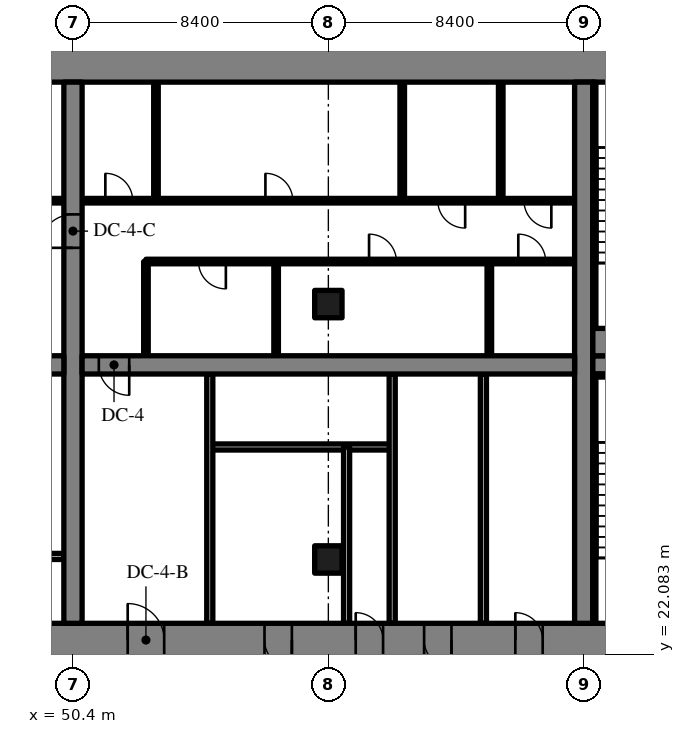
"""IFC4 building model, lengths in metres.
Left out: names, types, materials, properties, quantities, classifications, styles, units other than length and angle.
Written with IfcOpenShell. Run it as: python <this file> out.ifc"""

import sys

from ifc_helpers import new_model, si_unit, direction, frame, frame_2d, origin, origin_2d, place, context, subcontext, project, spatial, rectangle, extrude, source, transform, mapped, element, fill, save


model = new_model("IFC4")
c1 = context("Model", 3, precision=1e-05, world=origin(), true_north=direction((0.0, 1.0)))
c2 = subcontext(c1, "Body", "Model", "MODEL_VIEW")
j1 = project(units=[si_unit("LENGTHUNIT", "METRE"), si_unit("PLANEANGLEUNIT", "RADIAN")], contexts=[c1])
p1 = place(None, origin())
s1 = spatial("IfcSite", under=j1, at=p1, CompositionType="ELEMENT")
p2 = place(p1, origin())
s2 = spatial("IfcBuilding", under=s1, at=p2, CompositionType="ELEMENT")
p3 = place(p2, frame((0.0, 0.0, -4.5)))
s3 = spatial("IfcBuildingStorey", under=s2, at=p3, CompositionType="ELEMENT", Elevation=-4.5)
m1 = source(origin(), c2, "Body", "SweptSolid", [
    extrude(rectangle(XDim=50.4, YDim=1.1, at=frame_2d((25.2, 0.0))), origin(), (0.0, 0.0, 1.0), 4.22),
])
p4 = place(p3, frame((25.2, 22.55, 0.0), z_axis=(0.0, 0.0, 1.0), x_axis=(1.0, 0.0, 0.0)))
e1 = element("IfcWall", 1, at=p4, inside=s3, PredefinedType="SHEAR", context=c2, shape_type="MappedRepresentation", body=[
    mapped(m1, transform((0.0, 0.0, 0.0), scale=1.0)),
])
m2 = source(origin(), c2, "Body", "SweptSolid", [
    extrude(rectangle(XDim=1.8, YDim=2.1, at=frame_2d((0.9, 1.05))), frame((0.0, 0.56, 0.0), z_axis=(0.0, -1.0, 0.0), x_axis=(1.0, 0.0, 0.0)), (0.0, 0.0, 1.0), 1.12),
])
p5 = place(p4, frame((15.9, 0.0, 0.0)))
e2 = element("IfcOpeningElement", 2, at=p5, cuts=e1, PredefinedType="OPENING", context=c2, shape_type="MappedRepresentation", body=[
    mapped(m2, transform((0.0, 0.0, 0.0), scale=1.0)),
])
m3 = source(origin(), c2, "Body", "SweptSolid", [
    extrude(rectangle(XDim=1.2, YDim=2.1, at=frame_2d((0.6, 1.05))), frame((0.0, 0.56, 0.0), z_axis=(0.0, -1.0, 0.0), x_axis=(1.0, 0.0, 0.0)), (0.0, 0.0, 1.0), 1.12),
])
p6 = place(p4, frame((27.0, 0.0, 0.0)))
e3 = element("IfcOpeningElement", 3, at=p6, cuts=e1, PredefinedType="OPENING", context=c2, shape_type="MappedRepresentation", body=[
    mapped(m3, transform((0.0, 0.0, 0.0), scale=1.0)),
])
m4 = source(origin(), c2, "Body", "SweptSolid", [
    extrude(rectangle(XDim=0.9, YDim=2.1, at=frame_2d((0.45, 1.05))), frame((0.0, 0.56, 0.0), z_axis=(0.0, -1.0, 0.0), x_axis=(1.0, 0.0, 0.0)), (0.0, 0.0, 1.0), 1.12),
])
p7 = place(p4, frame((34.5, 0.0, 0.0)))
e4 = element("IfcOpeningElement", 4, at=p7, cuts=e1, PredefinedType="OPENING", context=c2, shape_type="MappedRepresentation", body=[
    mapped(m4, transform((0.0, 0.0, 0.0), scale=1.0)),
])
p8 = place(p4, frame((31.5, 0.0, 0.0)))
e5 = element("IfcOpeningElement", 5, at=p8, cuts=e1, PredefinedType="OPENING", context=c2, shape_type="MappedRepresentation", body=[
    mapped(m4, transform((0.0, 0.0, 0.0), scale=1.0)),
])
p9 = place(p4, frame((39.75, 0.0, 0.0)))
e6 = element("IfcOpeningElement", 6, at=p9, cuts=e1, PredefinedType="OPENING", context=c2, shape_type="MappedRepresentation", body=[
    mapped(m4, transform((0.0, 0.0, 0.0), scale=1.0)),
])
p10 = place(p4, frame((36.75, 0.0, 0.0)))
e7 = element("IfcOpeningElement", 7, at=p10, cuts=e1, PredefinedType="OPENING", context=c2, shape_type="MappedRepresentation", body=[
    mapped(m4, transform((0.0, 0.0, 0.0), scale=1.0)),
])
p11 = place(p4, frame((6.425, 0.0, 0.0)))
e8 = element("IfcOpeningElement", 8, at=p11, cuts=e1, PredefinedType="OPENING", context=c2, shape_type="MappedRepresentation", body=[
    mapped(m3, transform((0.0, 0.0, 0.0), scale=1.0)),
])
p12 = place(p4, frame((47.675, 0.0, 0.0)))
e9 = element("IfcOpeningElement", 9, at=p12, cuts=e1, PredefinedType="OPENING", context=c2, shape_type="MappedRepresentation", body=[
    mapped(m3, transform((0.0, 0.0, 0.0), scale=1.0)),
])
p13 = place(p3, frame((25.2, 41.45, 0.0), z_axis=(0.0, 0.0, 1.0), x_axis=(1.0, 0.0, 0.0)))
e10 = element("IfcWall", 10, at=p13, inside=s3, PredefinedType="SHEAR", context=c2, shape_type="MappedRepresentation", body=[
    mapped(m1, transform((0.0, 0.0, 0.0), scale=1.0)),
])
m5 = source(origin(), c2, "Body", "SweptSolid", [
    extrude(rectangle(XDim=17.8, YDim=0.6, at=frame_2d((8.9, 0.0))), origin(), (0.0, 0.0, 1.0), 4.22),
])
p14 = place(p3, frame((50.4, 23.1, 0.0), z_axis=(0.0, 0.0, 1.0), x_axis=(0.0, 1.0, 0.0)))
e11 = element("IfcWall", 11, at=p14, inside=s3, PredefinedType="SHEAR", context=c2, shape_type="MappedRepresentation", body=[
    mapped(m5, transform((0.0, 0.0, 0.0), scale=1.0)),
])
m6 = source(origin(), c2, "Body", "SweptSolid", [
    extrude(rectangle(XDim=1.1, YDim=2.1, at=frame_2d((0.55, 1.05))), frame((0.0, 0.31, 0.0), z_axis=(0.0, -1.0, 0.0), x_axis=(1.0, 0.0, 0.0)), (0.0, 0.0, 1.0), 0.62),
])
p15 = place(p14, frame((12.35, 0.0, 0.0)))
e12 = element("IfcOpeningElement", 12, at=p15, cuts=e11, PredefinedType="OPENING", context=c2, shape_type="MappedRepresentation", body=[
    mapped(m6, transform((0.0, 0.0, 0.0), scale=1.0)),
])
p16 = place(p3, frame((67.2, 23.1, 0.0), z_axis=(0.0, 0.0, 1.0), x_axis=(0.0, 1.0, 0.0)))
e13 = element("IfcWall", 13, at=p16, inside=s3, PredefinedType="SHEAR", context=c2, shape_type="MappedRepresentation", body=[
    mapped(m5, transform((0.0, 0.0, 0.0), scale=1.0)),
])
m7 = source(origin(), c2, "Body", "SweptSolid", [
    extrude(rectangle(XDim=16.2, YDim=0.6, at=frame_2d((8.1, 0.0))), origin(), (0.0, 0.0, 1.0), 4.22),
])
p17 = place(p3, frame((33.9, 31.6, 0.0), z_axis=(0.0, 0.0, 1.0), x_axis=(1.0, 0.0, 0.0)))
e14 = element("IfcWall", 14, at=p17, inside=s3, PredefinedType="SHEAR", context=c2, shape_type="MappedRepresentation", body=[
    mapped(m7, transform((0.0, 0.0, 0.0), scale=1.0)),
])
m8 = source(origin(), c2, "Body", "SweptSolid", [
    extrude(rectangle(XDim=1.0, YDim=2.1, at=frame_2d((0.5, 1.05))), frame((0.0, 0.31, 0.0), z_axis=(0.0, -1.0, 0.0), x_axis=(1.0, 0.0, 0.0)), (0.0, 0.0, 1.0), 0.62),
])
p18 = place(p17, frame((14.65, 0.0, 0.0)))
e15 = element("IfcOpeningElement", 15, at=p18, cuts=e14, PredefinedType="OPENING", context=c2, shape_type="MappedRepresentation", body=[
    mapped(m8, transform((0.0, 0.0, 0.0), scale=1.0)),
])
m9 = source(origin(), c2, "Body", "SweptSolid", [
    extrude(rectangle(XDim=16.2, YDim=0.6, at=frame_2d((8.1, 0.0))), origin(), (0.0, 0.0, 1.0), 4.22),
])
p19 = place(p3, frame((50.7, 31.6, 0.0), z_axis=(0.0, 0.0, 1.0), x_axis=(1.0, 0.0, 0.0)))
e16 = element("IfcWall", 16, at=p19, inside=s3, PredefinedType="SHEAR", context=c2, shape_type="MappedRepresentation", body=[
    mapped(m9, transform((0.0, 0.0, 0.0), scale=1.0)),
])
p20 = place(p19, frame((0.55, 0.0, 0.0)))
e17 = element("IfcOpeningElement", 17, at=p20, cuts=e16, PredefinedType="OPENING", context=c2, shape_type="MappedRepresentation", body=[
    mapped(m8, transform((0.0, 0.0, 0.0), scale=1.0)),
])
m10 = source(origin(), c2, "Body", "SweptSolid", [
    extrude(rectangle(XDim=7.0, YDim=0.6, at=frame_2d((3.5, 0.0))), origin(), (0.0, 0.0, 1.0), 4.22),
])
p21 = place(p3, frame((67.5, 31.6, 0.0), z_axis=(0.0, 0.0, 1.0), x_axis=(1.0, 0.0, 0.0)))
e18 = element("IfcWall", 18, at=p21, inside=s3, PredefinedType="SHEAR", context=c2, shape_type="MappedRepresentation", body=[
    mapped(m10, transform((0.0, 0.0, 0.0), scale=1.0)),
])
p22 = place(p21, frame((5.425, 0.0, 0.0)))
e19 = element("IfcOpeningElement", 19, at=p22, cuts=e18, PredefinedType="OPENING", context=c2, shape_type="MappedRepresentation", body=[
    mapped(m6, transform((0.0, 0.0, 0.0), scale=1.0)),
])
m11 = source(origin(), c2, "Body", "SweptSolid", [
    extrude(rectangle(XDim=0.9, YDim=0.9, at=origin_2d()), origin(), (0.0, 0.0, 1.0), 4.22),
])
for number, where, z_axis, x_axis in (
    (20, (58.8, 25.2, 0.0), (0.0, 0.0, 1.0), (1.0, 0.0, 0.0)),
    (21, (58.8, 33.6, 0.0), (0.0, 0.0, 1.0), (1.0, 0.0, 0.0)),
):
    element("IfcColumn", number, at=place(p3, frame(where, z_axis=z_axis, x_axis=x_axis)), inside=s3, PredefinedType="COLUMN", context=c2, shape_type="MappedRepresentation", body=[
        mapped(m11, transform((0.0, 0.0, 0.0), scale=1.0)),
    ])
m12 = source(origin(), c2, "Body", "SweptSolid", [
    extrude(rectangle(XDim=6.0, YDim=0.2, at=frame_2d((3.0, 0.0))), origin(), (0.0, 0.0, 1.0), 4.22),
])
p23 = place(p3, frame((44.1, 25.3, 0.0), z_axis=(0.0, 0.0, 1.0), x_axis=(1.0, 0.0, 0.0)))
e22 = element("IfcWall", 22, at=p23, inside=s3, PredefinedType="SOLIDWALL", context=c2, shape_type="MappedRepresentation", body=[
    mapped(m12, transform((0.0, 0.0, 0.0), scale=1.0)),
])
m13 = source(origin(), c2, "Body", "SweptSolid", [
    extrude(rectangle(XDim=1.1, YDim=2.1, at=frame_2d((0.55, 1.05))), frame((0.0, 0.11, 0.0), z_axis=(0.0, -1.0, 0.0), x_axis=(1.0, 0.0, 0.0)), (0.0, 0.0, 1.0), 0.22),
])
p24 = place(p23, frame((0.95, 0.0, 0.0)))
e23 = element("IfcOpeningElement", 23, at=p24, cuts=e22, PredefinedType="OPENING", context=c2, shape_type="MappedRepresentation", body=[
    mapped(m13, transform((0.0, 0.0, 0.0), scale=1.0)),
])
p25 = place(p23, frame((3.95, 0.0, 0.0)))
e24 = element("IfcOpeningElement", 24, at=p25, cuts=e22, PredefinedType="OPENING", context=c2, shape_type="MappedRepresentation", body=[
    mapped(m13, transform((0.0, 0.0, 0.0), scale=1.0)),
])
m14 = source(origin(), c2, "Body", "SweptSolid", [
    extrude(rectangle(XDim=16.2, YDim=0.15, at=frame_2d((8.1, 0.0))), origin(), (0.0, 0.0, 1.0), 4.22),
])
p26 = place(p3, frame((33.9, 37.0, 0.0), z_axis=(0.0, 0.0, 1.0), x_axis=(1.0, 0.0, 0.0)))
e25 = element("IfcWall", 25, at=p26, inside=s3, PredefinedType="PARTITIONING", context=c2, shape_type="MappedRepresentation", body=[
    mapped(m14, transform((0.0, 0.0, 0.0), scale=1.0)),
])
m15 = source(origin(), c2, "Body", "SweptSolid", [
    extrude(rectangle(XDim=0.9, YDim=2.1, at=frame_2d((0.45, 1.05))), frame((0.0, 0.085, 0.0), z_axis=(0.0, -1.0, 0.0), x_axis=(1.0, 0.0, 0.0)), (0.0, 0.0, 1.0), 0.17),
])
p27 = place(p26, frame((3.195, 0.0, 0.0)))
e26 = element("IfcOpeningElement", 26, at=p27, cuts=e25, PredefinedType="OPENING", context=c2, shape_type="MappedRepresentation", body=[
    mapped(m15, transform((0.0, 0.0, 0.0), scale=1.0)),
])
p28 = place(p26, frame((8.055, 0.0, 0.0)))
e27 = element("IfcOpeningElement", 27, at=p28, cuts=e25, PredefinedType="OPENING", context=c2, shape_type="MappedRepresentation", body=[
    mapped(m15, transform((0.0, 0.0, 0.0), scale=1.0)),
])
p29 = place(p26, frame((11.295, 0.0, 0.0)))
e28 = element("IfcOpeningElement", 28, at=p29, cuts=e25, PredefinedType="OPENING", context=c2, shape_type="MappedRepresentation", body=[
    mapped(m15, transform((0.0, 0.0, 0.0), scale=1.0)),
])
p30 = place(p26, frame((14.535, 0.0, 0.0)))
e29 = element("IfcOpeningElement", 29, at=p30, cuts=e25, PredefinedType="OPENING", context=c2, shape_type="MappedRepresentation", body=[
    mapped(m15, transform((0.0, 0.0, 0.0), scale=1.0)),
])
p31 = place(p3, frame((60.9, 28.9, 0.0), z_axis=(0.0, 0.0, 1.0), x_axis=(-1.0, 0.0, 0.0)))
e30 = element("IfcWall", 30, at=p31, inside=s3, PredefinedType="SOLIDWALL", context=c2, shape_type="MappedRepresentation", body=[
    mapped(m12, transform((0.0, 0.0, 0.0), scale=1.0)),
])
m16 = source(origin(), c2, "Body", "SweptSolid", [
    extrude(rectangle(XDim=8.2, YDim=0.2, at=frame_2d((4.1, 0.0))), origin(), (0.0, 0.0, 1.0), 4.22),
])
for number, where, z_axis, x_axis in (
    (31, (54.9, 23.1, 0.0), (0.0, 0.0, 1.0), (0.0, 1.0, 0.0)),
    (32, (60.9, 23.1, 0.0), (0.0, 0.0, 1.0), (0.0, 1.0, 0.0)),
):
    element("IfcWall", number, at=place(p3, frame(where, z_axis=z_axis, x_axis=x_axis)), inside=s3, PredefinedType="PARTITIONING", context=c2, shape_type="MappedRepresentation", body=[
        mapped(m16, transform((0.0, 0.0, 0.0), scale=1.0)),
    ])
m17 = source(origin(), c2, "Body", "SweptSolid", [
    extrude(rectangle(XDim=5.8, YDim=0.2, at=frame_2d((2.9, 0.0))), origin(), (0.0, 0.0, 1.0), 4.22),
])
p32 = place(p3, frame((59.4, 23.1, 0.0), z_axis=(0.0, 0.0, 1.0), x_axis=(0.0, 1.0, 0.0)))
e33 = element("IfcWall", 33, at=p32, inside=s3, PredefinedType="PARTITIONING", context=c2, shape_type="MappedRepresentation", body=[
    mapped(m17, transform((0.0, 0.0, 0.0), scale=1.0)),
])
p33 = place(p3, frame((63.9, 23.1, 0.0), z_axis=(0.0, 0.0, 1.0), x_axis=(0.0, 1.0, 0.0)))
e34 = element("IfcWall", 34, at=p33, inside=s3, PredefinedType="PARTITIONING", context=c2, shape_type="MappedRepresentation", body=[
    mapped(m16, transform((0.0, 0.0, 0.0), scale=1.0)),
])
m18 = source(origin(), c2, "Body", "SweptSolid", [
    extrude(rectangle(XDim=3.1, YDim=0.15, at=frame_2d((1.55, 0.0))), origin(), (0.0, 0.0, 1.0), 4.22),
])
p34 = place(p3, frame((52.8, 31.9, 0.0), z_axis=(0.0, 0.0, 1.0), x_axis=(0.0, 1.0, 0.0)))
e35 = element("IfcWall", 35, at=p34, inside=s3, PredefinedType="PARTITIONING", context=c2, shape_type="MappedRepresentation", body=[
    mapped(m18, transform((0.0, 0.0, 0.0), scale=1.0)),
])
m19 = source(origin(), c2, "Body", "SweptSolid", [
    extrude(rectangle(XDim=14.1, YDim=0.15, at=frame_2d((7.05, 0.0))), origin(), (0.0, 0.0, 1.0), 4.22),
])
p35 = place(p3, frame((66.9, 35.0, 0.0), z_axis=(0.0, 0.0, 1.0), x_axis=(-1.0, 0.0, 0.0)))
e36 = element("IfcWall", 36, at=p35, inside=s3, PredefinedType="PARTITIONING", context=c2, shape_type="MappedRepresentation", body=[
    mapped(m19, transform((0.0, 0.0, 0.0), scale=1.0)),
])
p36 = place(p35, frame((0.952, 0.0, 0.0)))
e37 = element("IfcOpeningElement", 37, at=p36, cuts=e36, PredefinedType="OPENING", context=c2, shape_type="MappedRepresentation", body=[
    mapped(m15, transform((0.0, 0.0, 0.0), scale=1.0)),
])
p37 = place(p35, frame((5.861, 0.0, 0.0)))
e38 = element("IfcOpeningElement", 38, at=p37, cuts=e36, PredefinedType="OPENING", context=c2, shape_type="MappedRepresentation", body=[
    mapped(m15, transform((0.0, 0.0, 0.0), scale=1.0)),
])
p38 = place(p35, frame((11.471, 0.0, 0.0)))
e39 = element("IfcOpeningElement", 39, at=p38, cuts=e36, PredefinedType="OPENING", context=c2, shape_type="MappedRepresentation", body=[
    mapped(m15, transform((0.0, 0.0, 0.0), scale=1.0)),
])
m20 = source(origin(), c2, "Body", "SweptSolid", [
    extrude(rectangle(XDim=16.2, YDim=0.15, at=frame_2d((8.1, 0.0))), origin(), (0.0, 0.0, 1.0), 4.22),
])
p39 = place(p3, frame((66.9, 37.0, 0.0), z_axis=(0.0, 0.0, 1.0), x_axis=(-1.0, 0.0, 0.0)))
e40 = element("IfcWall", 40, at=p39, inside=s3, PredefinedType="PARTITIONING", context=c2, shape_type="MappedRepresentation", body=[
    mapped(m20, transform((0.0, 0.0, 0.0), scale=1.0)),
])
p40 = place(p39, frame((0.765, 0.0, 0.0)))
e41 = element("IfcOpeningElement", 41, at=p40, cuts=e40, PredefinedType="OPENING", context=c2, shape_type="MappedRepresentation", body=[
    mapped(m15, transform((0.0, 0.0, 0.0), scale=1.0)),
])
p41 = place(p39, frame((3.6, 0.0, 0.0)))
e42 = element("IfcOpeningElement", 42, at=p41, cuts=e40, PredefinedType="OPENING", context=c2, shape_type="MappedRepresentation", body=[
    mapped(m15, transform((0.0, 0.0, 0.0), scale=1.0)),
])
p42 = place(p39, frame((9.27, 0.0, 0.0)))
e43 = element("IfcOpeningElement", 43, at=p42, cuts=e40, PredefinedType="OPENING", context=c2, shape_type="MappedRepresentation", body=[
    mapped(m15, transform((0.0, 0.0, 0.0), scale=1.0)),
])
p43 = place(p39, frame((14.535, 0.0, 0.0)))
e44 = element("IfcOpeningElement", 44, at=p43, cuts=e40, PredefinedType="OPENING", context=c2, shape_type="MappedRepresentation", body=[
    mapped(m15, transform((0.0, 0.0, 0.0), scale=1.0)),
])
for number, where, z_axis, x_axis in (
    (45, (64.095, 31.9, 0.0), (0.0, 0.0, 1.0), (0.0, 1.0, 0.0)),
    (46, (57.082, 31.9, 0.0), (0.0, 0.0, 1.0), (0.0, 1.0, 0.0)),
):
    element("IfcWall", number, at=place(p3, frame(where, z_axis=z_axis, x_axis=x_axis)), inside=s3, PredefinedType="PARTITIONING", context=c2, shape_type="MappedRepresentation", body=[
        mapped(m18, transform((0.0, 0.0, 0.0), scale=1.0)),
    ])
m21 = source(origin(), c2, "Body", "SweptSolid", [
    extrude(rectangle(XDim=3.9, YDim=0.15, at=frame_2d((1.95, 0.0))), origin(), (0.0, 0.0, 1.0), 4.22),
])
for number, where, z_axis, x_axis in (
    (47, (64.47, 37.0, 0.0), (0.0, 0.0, 1.0), (0.0, 1.0, 0.0)),
    (48, (61.23, 37.0, 0.0), (0.0, 0.0, 1.0), (0.0, 1.0, 0.0)),
    (49, (53.13, 37.0, 0.0), (0.0, 0.0, 1.0), (0.0, 1.0, 0.0)),
):
    element("IfcWall", number, at=place(p3, frame(where, z_axis=z_axis, x_axis=x_axis)), inside=s3, PredefinedType="PARTITIONING", context=c2, shape_type="MappedRepresentation", body=[
        mapped(m21, transform((0.0, 0.0, 0.0), scale=1.0)),
    ])
m22 = source(origin(), c2, "Body", "SweptSolid", [
    extrude(rectangle(XDim=4.75, YDim=0.1, at=frame_2d((2.375, 0.0))), origin(), (0.0, 0.0, 1.0), 4.22),
])
p44 = place(p3, frame((67.5, 31.25, 0.0), z_axis=(0.0, 0.0, 1.0), x_axis=(1.0, 0.0, 0.0)))
e50 = element("IfcWall", 50, at=p44, inside=s3, PredefinedType="SOLIDWALL", context=c2, shape_type="MappedRepresentation", body=[
    mapped(m22, transform((0.0, 0.0, 0.0), scale=1.0)),
])
m23 = source(origin(), c2, "Body", "SweptSolid", [
    extrude(rectangle(XDim=8.1, YDim=0.1, at=frame_2d((4.05, 0.0))), origin(), (0.0, 0.0, 1.0), 4.22),
])
p45 = place(p3, frame((67.55, 23.1, 0.0), z_axis=(0.0, 0.0, 1.0), x_axis=(0.0, 1.0, 0.0)))
e51 = element("IfcWall", 51, at=p45, inside=s3, PredefinedType="SOLIDWALL", context=c2, shape_type="MappedRepresentation", body=[
    mapped(m23, transform((0.0, 0.0, 0.0), scale=1.0)),
])
m24 = source(origin(), c2, "Body", "SweptSolid", [
    extrude(rectangle(XDim=4.75, YDim=0.9, at=frame_2d((2.375, 0.0))), origin(), (0.0, 0.0, 1.0), 4.22),
])
p46 = place(p3, frame((67.5, 32.35, 0.0), z_axis=(0.0, 0.0, 1.0), x_axis=(1.0, 0.0, 0.0)))
e52 = element("IfcWall", 52, at=p46, inside=s3, PredefinedType="SOLIDWALL", context=c2, shape_type="MappedRepresentation", body=[
    mapped(m24, transform((0.0, 0.0, 0.0), scale=1.0)),
])
p47 = place(p3, frame((67.55, 32.8, 0.0), z_axis=(0.0, 0.0, 1.0), x_axis=(0.0, 1.0, 0.0)))
e53 = element("IfcWall", 53, at=p47, inside=s3, PredefinedType="SOLIDWALL", context=c2, shape_type="MappedRepresentation", body=[
    mapped(m23, transform((0.0, 0.0, 0.0), scale=1.0)),
])
m25 = source(origin(), c2, "Body", "SweptSolid", [
    extrude(rectangle(XDim=1.2, YDim=2.1, at=frame_2d((0.6, 1.05))), frame((0.0, 0.325, 0.0), z_axis=(0.0, -1.0, 0.0), x_axis=(1.0, 0.0, 0.0)), (0.0, 0.0, 1.0), 0.05),
])
p48 = place(p6, origin())
e54 = element("IfcDoor", 54, at=p48, inside=s3, OperationType="SINGLE_SWING_LEFT", PredefinedType="DOOR", context=c2, shape_type="MappedRepresentation", body=[
    mapped(m25, transform((0.0, 0.0, 0.0), scale=1.0)),
])
fill(e3, e54)
m26 = source(origin(), c2, "Body", "SweptSolid", [
    extrude(rectangle(XDim=1.0, YDim=2.1, at=frame_2d((0.5, 1.05))), frame((0.0, 0.025, 0.0), z_axis=(0.0, -1.0, 0.0), x_axis=(1.0, 0.0, 0.0)), (0.0, 0.0, 1.0), 0.05),
])
p49 = place(p20, origin())
e55 = element("IfcDoor", 55, at=p49, inside=s3, OperationType="SINGLE_SWING_RIGHT", PredefinedType="DOOR", context=c2, shape_type="MappedRepresentation", body=[
    mapped(m26, transform((0.0, 0.0, 0.0), scale=1.0)),
])
fill(e17, e55)
m27 = source(origin(), c2, "Body", "SweptSolid", [
    extrude(rectangle(XDim=0.9, YDim=2.1, at=frame_2d((0.45, 1.05))), frame((0.0, 0.325, 0.0), z_axis=(0.0, -1.0, 0.0), x_axis=(1.0, 0.0, 0.0)), (0.0, 0.0, 1.0), 0.05),
])
p50 = place(p7, origin())
e56 = element("IfcDoor", 56, at=p50, inside=s3, OperationType="SINGLE_SWING_LEFT", PredefinedType="DOOR", context=c2, shape_type="MappedRepresentation", body=[
    mapped(m27, transform((0.0, 0.0, 0.0), scale=1.0)),
])
fill(e4, e56)
p51 = place(p8, origin())
e57 = element("IfcDoor", 57, at=p51, inside=s3, OperationType="SINGLE_SWING_RIGHT", PredefinedType="DOOR", context=c2, shape_type="MappedRepresentation", body=[
    mapped(m27, transform((0.0, 0.0, 0.0), scale=1.0)),
])
fill(e5, e57)
p52 = place(p9, origin())
e58 = element("IfcDoor", 58, at=p52, inside=s3, OperationType="SINGLE_SWING_LEFT", PredefinedType="DOOR", context=c2, shape_type="MappedRepresentation", body=[
    mapped(m27, transform((0.0, 0.0, 0.0), scale=1.0)),
])
fill(e6, e58)
p53 = place(p10, origin())
e59 = element("IfcDoor", 59, at=p53, inside=s3, OperationType="SINGLE_SWING_RIGHT", PredefinedType="DOOR", context=c2, shape_type="MappedRepresentation", body=[
    mapped(m27, transform((0.0, 0.0, 0.0), scale=1.0)),
])
fill(e7, e59)
m28 = source(origin(), c2, "Body", "SweptSolid", [
    extrude(rectangle(XDim=0.9, YDim=2.1, at=frame_2d((0.45, 1.05))), frame((0.0, 0.025, 0.0), z_axis=(0.0, -1.0, 0.0), x_axis=(1.0, 0.0, 0.0)), (0.0, 0.0, 1.0), 0.05),
])
p54 = place(p36, origin())
e60 = element("IfcDoor", 60, at=p54, inside=s3, OperationType="SINGLE_SWING_RIGHT", PredefinedType="DOOR", context=c2, shape_type="MappedRepresentation", body=[
    mapped(m28, transform((0.0, 0.0, 0.0), scale=1.0)),
])
fill(e37, e60)
p55 = place(p37, origin())
e61 = element("IfcDoor", 61, at=p55, inside=s3, OperationType="SINGLE_SWING_RIGHT", PredefinedType="DOOR", context=c2, shape_type="MappedRepresentation", body=[
    mapped(m28, transform((0.0, 0.0, 0.0), scale=1.0)),
])
fill(e38, e61)
p56 = place(p38, origin())
e62 = element("IfcDoor", 62, at=p56, inside=s3, OperationType="SINGLE_SWING_LEFT", PredefinedType="DOOR", context=c2, shape_type="MappedRepresentation", body=[
    mapped(m28, transform((0.0, 0.0, 0.0), scale=1.0)),
])
fill(e39, e62)
p57 = place(p40, origin())
e63 = element("IfcDoor", 63, at=p57, inside=s3, OperationType="SINGLE_SWING_LEFT", PredefinedType="DOOR", context=c2, shape_type="MappedRepresentation", body=[
    mapped(m28, transform((0.0, 0.0, 0.0), scale=1.0)),
])
fill(e41, e63)
p58 = place(p41, origin())
e64 = element("IfcDoor", 64, at=p58, inside=s3, OperationType="SINGLE_SWING_LEFT", PredefinedType="DOOR", context=c2, shape_type="MappedRepresentation", body=[
    mapped(m28, transform((0.0, 0.0, 0.0), scale=1.0)),
])
fill(e42, e64)
p59 = place(p42, origin())
e65 = element("IfcDoor", 65, at=p59, inside=s3, OperationType="SINGLE_SWING_RIGHT", PredefinedType="DOOR", context=c2, shape_type="MappedRepresentation", body=[
    mapped(m28, transform((0.0, 0.0, 0.0), scale=1.0)),
])
fill(e43, e65)
p60 = place(p43, origin())
e66 = element("IfcDoor", 66, at=p60, inside=s3, OperationType="SINGLE_SWING_RIGHT", PredefinedType="DOOR", context=c2, shape_type="MappedRepresentation", body=[
    mapped(m28, transform((0.0, 0.0, 0.0), scale=1.0)),
])
fill(e44, e66)
m29 = source(origin(), c2, "Body", "SweptSolid", [
    extrude(rectangle(XDim=1.1, YDim=2.1, at=frame_2d((0.55, 1.05))), frame((0.0, 0.025, 0.0), z_axis=(0.0, -1.0, 0.0), x_axis=(1.0, 0.0, 0.0)), (0.0, 0.0, 1.0), 0.05),
])
p61 = place(p15, origin())
e67 = element("IfcDoor", 67, at=p61, inside=s3, OperationType="SINGLE_SWING_LEFT", PredefinedType="DOOR", context=c2, shape_type="MappedRepresentation", body=[
    mapped(m29, transform((0.0, 0.0, 0.0), scale=1.0)),
])
fill(e12, e67)
save(model, sys.argv[1])
